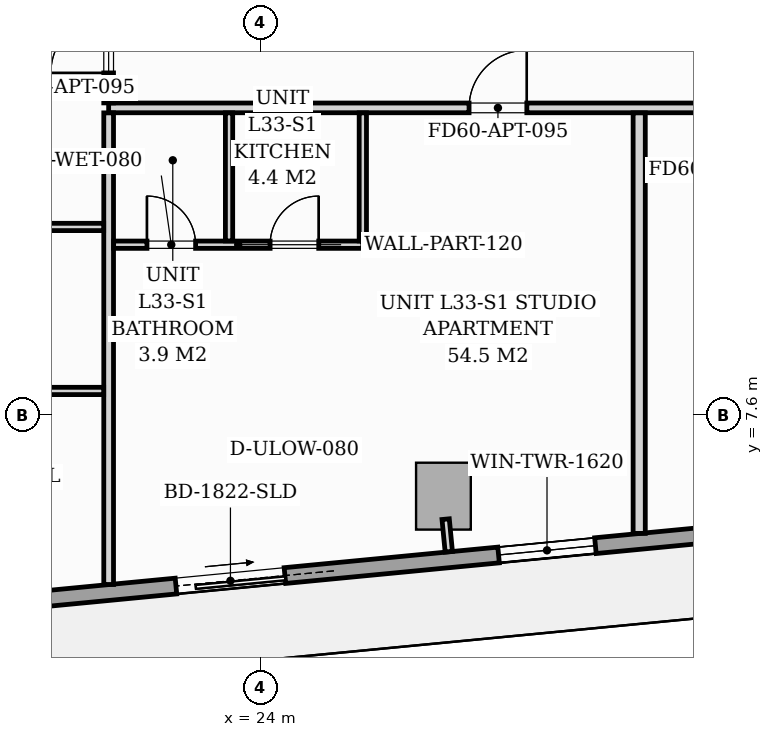
"""IFC4 building model, lengths in metres.
Left out: names, types, materials, properties, quantities, classifications, styles, units other than length and angle.
Written with IfcOpenShell. Run it as: python <this file> out.ifc"""

import sys

from ifc_helpers import new_model, si_unit, direction, frame, frame_2d, origin, origin_2d, place, context, subcontext, project, spatial, rectangle, extrude, source, transform, mapped, element, fill, save


model = new_model("IFC4")
c1 = context("Model", 3, precision=1e-05, world=origin(), true_north=direction((0.0, 1.0)))
c2 = subcontext(c1, "Body", "Model", "MODEL_VIEW")
j1 = project(units=[si_unit("LENGTHUNIT", "METRE"), si_unit("PLANEANGLEUNIT", "RADIAN")], contexts=[c1])
p1 = place(None, origin())
s1 = spatial("IfcSite", under=j1, at=p1, CompositionType="ELEMENT")
p2 = place(p1, origin())
s2 = spatial("IfcBuilding", under=s1, at=p2, CompositionType="ELEMENT")
p3 = place(p2, frame((0.0, 0.0, 116.2)))
s3 = spatial("IfcBuildingStorey", under=s2, at=p3, CompositionType="ELEMENT", Elevation=116.2)
m1 = source(origin(), c2, "Body", "SweptSolid", [
    extrude(rectangle(XDim=0.9, YDim=1.1, at=origin_2d()), origin(), (0.0, 0.0, 1.0), 3.194),
])
p4 = place(p3, frame((27.006, 6.265, 0.002), z_axis=(0.0, 0.0, 1.0), x_axis=(0.995396198367, 0.09584575252, 0.0)))
e1 = element("IfcColumn", 1, at=p4, inside=s3, PredefinedType="COLUMN", context=c2, shape_type="MappedRepresentation", body=[
    mapped(m1, transform((0.0, 0.0, 0.0), scale=1.0)),
])
p5 = place(p3, frame((31.994, 5.69, 0.0), z_axis=(0.0, 0.0, 1.0), x_axis=(-0.995396521236, -0.095842399342, 0.0)))
e2 = element("IfcWall", 2, at=p5, inside=s3, PredefinedType="STANDARD", context=c2, shape_type="SweptSolid", body=[
    extrude(rectangle(XDim=19.11, YDim=0.26, at=frame_2d((9.555, 0.0))), origin(), (0.0, 0.0, 1.0), 2.9),
])
p6 = place(p5, frame((7.63, 0.0, 0.0)))
e3 = element("IfcOpeningElement", 3, at=p6, cuts=e2, PredefinedType="OPENING", context=c2, shape_type="SweptSolid", body=[
    extrude(rectangle(XDim=1.8, YDim=2.06, at=frame_2d((0.9, 1.03))), frame((0.0, 0.14, 0.0), z_axis=(0.0, -1.0, 0.0), x_axis=(1.0, 0.0, 0.0)), (0.0, 0.0, 1.0), 0.28),
])
p7 = place(p5, frame((2.5, 0.0, 0.65)))
e4 = element("IfcOpeningElement", 4, at=p7, cuts=e2, PredefinedType="OPENING", context=c2, shape_type="SweptSolid", body=[
    extrude(rectangle(XDim=1.6, YDim=1.5, at=frame_2d((0.8, 0.75))), frame((0.0, 0.14, 0.0), z_axis=(0.0, -1.0, 0.0), x_axis=(1.0, 0.0, 0.0)), (0.0, 0.0, 1.0), 0.28),
])
p8 = place(p3, frame((21.5, 12.65, 0.0), z_axis=(0.0, 0.0, 1.0), x_axis=(1.0, 0.0, 0.0)))
e5 = element("IfcWall", 5, at=p8, inside=s3, PredefinedType="PARTITIONING", context=c2, shape_type="SweptSolid", body=[
    extrude(rectangle(XDim=26.2, YDim=0.16, at=frame_2d((13.1, 0.0))), origin(), (0.0, 0.0, 1.0), 2.9),
])
p9 = place(p8, frame((5.927, 0.0, 0.0)))
e6 = element("IfcOpeningElement", 6, at=p9, cuts=e5, PredefinedType="OPENING", context=c2, shape_type="SweptSolid", body=[
    extrude(rectangle(XDim=0.95, YDim=2.06, at=frame_2d((0.475, 1.03))), frame((0.0, 0.09, 0.0), z_axis=(0.0, -1.0, 0.0), x_axis=(1.0, 0.0, 0.0)), (0.0, 0.0, 1.0), 0.18),
])
p10 = place(p8, frame((10.575, 0.0, 0.0)))
e7 = element("IfcOpeningElement", 7, at=p10, cuts=e5, PredefinedType="OPENING", context=c2, shape_type="SweptSolid", body=[
    extrude(rectangle(XDim=0.95, YDim=2.06, at=frame_2d((0.475, 1.03))), frame((0.0, 0.09, 0.0), z_axis=(0.0, -1.0, 0.0), x_axis=(1.0, 0.0, 0.0)), (0.0, 0.0, 1.0), 0.18),
])
p11 = place(p8, frame((19.322, 0.0, 0.0)))
e8 = element("IfcOpeningElement", 8, at=p11, cuts=e5, PredefinedType="OPENING", context=c2, shape_type="SweptSolid", body=[
    extrude(rectangle(XDim=0.95, YDim=2.06, at=frame_2d((0.475, 1.03))), frame((0.0, 0.09, 0.0), z_axis=(0.0, -1.0, 0.0), x_axis=(1.0, 0.0, 0.0)), (0.0, 0.0, 1.0), 0.18),
])
p12 = place(p3, frame((21.5, 4.812, 0.0), z_axis=(0.0, 0.0, 1.0), x_axis=(0.0, 1.0, 0.0)))
e9 = element("IfcWall", 9, at=p12, inside=s3, PredefinedType="PARTITIONING", context=c2, shape_type="SweptSolid", body=[
    extrude(rectangle(XDim=7.756, YDim=0.16, at=frame_2d((3.878, 0.0))), origin(), (0.0, 0.0, 1.0), 2.9),
])
p13 = place(p3, frame((21.5, 12.732, 0.0), z_axis=(0.0, 0.0, 1.0), x_axis=(0.0, 1.0, 0.0)))
e10 = element("IfcWall", 10, at=p13, inside=s3, PredefinedType="PARTITIONING", context=c2, shape_type="SweptSolid", body=[
    extrude(rectangle(XDim=11.647, YDim=0.16, at=frame_2d((5.823, 0.0))), origin(), (0.0, 0.0, 1.0), 2.9),
])
p14 = place(p13, frame((0.493, 0.0, 0.0)))
e11 = element("IfcOpeningElement", 11, at=p14, cuts=e10, PredefinedType="OPENING", context=c2, shape_type="SweptSolid", body=[
    extrude(rectangle(XDim=0.95, YDim=2.06, at=frame_2d((0.475, 1.03))), frame((0.0, 0.09, 0.0), z_axis=(0.0, -1.0, 0.0), x_axis=(1.0, 0.0, 0.0)), (0.0, 0.0, 1.0), 0.18),
])
p15 = place(p13, frame((6.085, 0.0, 0.0)))
e12 = element("IfcOpeningElement", 12, at=p15, cuts=e10, PredefinedType="OPENING", context=c2, shape_type="SweptSolid", body=[
    extrude(rectangle(XDim=0.95, YDim=2.06, at=frame_2d((0.475, 1.03))), frame((0.0, 0.09, 0.0), z_axis=(0.0, -1.0, 0.0), x_axis=(1.0, 0.0, 0.0)), (0.0, 0.0, 1.0), 0.18),
])
p16 = place(p3, frame((21.582, 10.4, 0.0), z_axis=(0.0, 0.0, 1.0), x_axis=(1.0, 0.0, 0.0)))
e13 = element("IfcWall", 13, at=p16, inside=s3, PredefinedType="PARTITIONING", context=c2, shape_type="SweptSolid", body=[
    extrude(rectangle(XDim=4.098, YDim=0.12, at=frame_2d((2.049, 0.0))), origin(), (0.0, 0.0, 1.0), 2.9),
])
p17 = place(p16, frame((0.548, 0.0, 0.0)))
e14 = element("IfcOpeningElement", 14, at=p17, cuts=e13, PredefinedType="OPENING", context=c2, shape_type="SweptSolid", body=[
    extrude(rectangle(XDim=0.8, YDim=2.02, at=frame_2d((0.4, 1.01))), frame((0.0, 0.07, 0.0), z_axis=(0.0, -1.0, 0.0), x_axis=(1.0, 0.0, 0.0)), (0.0, 0.0, 1.0), 0.14),
])
p18 = place(p16, frame((2.573, 0.0, 0.0)))
e15 = element("IfcOpeningElement", 15, at=p18, cuts=e13, PredefinedType="OPENING", context=c2, shape_type="SweptSolid", body=[
    extrude(rectangle(XDim=0.8, YDim=2.0, at=frame_2d((0.4, 1.0))), frame((0.0, 0.07, 0.0), z_axis=(0.0, -1.0, 0.0), x_axis=(1.0, 0.0, 0.0)), (0.0, 0.0, 1.0), 0.14),
])
for number, where, z_axis, x_axis in (
    (16, (25.68, 10.462, 0.0), (0.0, 0.0, 1.0), (0.0, 1.0, 0.0)),
    (17, (23.48, 10.462, 0.0), (0.0, 0.0, 1.0), (0.0, 1.0, 0.0)),
):
    element("IfcWall", number, at=place(p3, frame(where, z_axis=z_axis, x_axis=x_axis)), inside=s3, PredefinedType="PARTITIONING", context=c2, shape_type="SweptSolid", body=[
        extrude(rectangle(XDim=2.106, YDim=0.12, at=frame_2d((1.053, 0.0))), origin(), (0.0, 0.0, 1.0), 2.9),
    ])
p19 = place(p3, frame((30.225, 5.653, 0.0), z_axis=(0.0, 0.0, 1.0), x_axis=(0.0, 1.0, 0.0)))
e18 = element("IfcWall", 18, at=p19, inside=s3, PredefinedType="PARTITIONING", context=c2, shape_type="SweptSolid", body=[
    extrude(rectangle(XDim=6.916, YDim=0.2, at=frame_2d((3.458, 0.0))), origin(), (0.0, 0.0, 1.0), 2.9),
])
p20 = place(p3, frame((12.377, 7.995, 0.0), z_axis=(0.0, 0.0, 1.0), x_axis=(1.0, 0.0, 0.0)))
e19 = element("IfcWall", 19, at=p20, inside=s3, PredefinedType="PARTITIONING", context=c2, shape_type="SweptSolid", body=[
    extrude(rectangle(XDim=9.041, YDim=0.12, at=frame_2d((4.521, 0.0))), origin(), (0.0, 0.0, 1.0), 2.9),
])
p21 = place(p20, frame((4.096, 0.0, 0.0)))
e20 = element("IfcOpeningElement", 20, at=p21, cuts=e19, PredefinedType="OPENING", context=c2, shape_type="SweptSolid", body=[
    extrude(rectangle(XDim=0.85, YDim=2.05, at=frame_2d((0.425, 1.025))), frame((0.0, 0.07, 0.0), z_axis=(0.0, -1.0, 0.0), x_axis=(1.0, 0.0, 0.0)), (0.0, 0.0, 1.0), 0.14),
])
p22 = place(p3, frame((12.377, 10.692, 0.0), z_axis=(0.0, 0.0, 1.0), x_axis=(1.0, 0.0, 0.0)))
e21 = element("IfcWall", 21, at=p22, inside=s3, PredefinedType="PARTITIONING", context=c2, shape_type="SweptSolid", body=[
    extrude(rectangle(XDim=9.041, YDim=0.12, at=frame_2d((4.521, 0.0))), origin(), (0.0, 0.0, 1.0), 2.9),
])
p23 = place(p22, frame((4.096, 0.0, 0.0)))
e22 = element("IfcOpeningElement", 22, at=p23, cuts=e21, PredefinedType="OPENING", context=c2, shape_type="SweptSolid", body=[
    extrude(rectangle(XDim=0.85, YDim=2.05, at=frame_2d((0.425, 1.025))), frame((0.0, 0.07, 0.0), z_axis=(0.0, -1.0, 0.0), x_axis=(1.0, 0.0, 0.0)), (0.0, 0.0, 1.0), 0.14),
])
p24 = place(p3, frame((27.042, 5.887, 0.0), z_axis=(0.0, 0.0, 1.0), x_axis=(0.096222656154, -0.995359834654, 0.0)))
e23 = element("IfcWall", 23, at=p24, inside=s3, PredefinedType="PARTITIONING", context=c2, shape_type="SweptSolid", body=[
    extrude(rectangle(XDim=0.538, YDim=0.12, at=frame_2d((0.269, 0.0))), origin(), (0.0, 0.0, 1.0), 2.9),
])
m2 = source(origin(), c2, "Body", "SweptSolid", [
    extrude(rectangle(XDim=1.8, YDim=2.06, at=frame_2d((0.9, 1.03))), frame((0.0, 0.025, 0.0), z_axis=(0.0, -1.0, 0.0), x_axis=(1.0, 0.0, 0.0)), (0.0, 0.0, 1.0), 0.05),
])
p25 = place(p6, origin())
e24 = element("IfcDoor", 24, at=p25, inside=s3, OperationType="SLIDING_TO_LEFT", PredefinedType="DOOR", context=c2, shape_type="MappedRepresentation", body=[
    mapped(m2, transform((0.0, 0.0, 0.0), scale=1.0)),
])
fill(e3, e24)
m3 = source(origin(), c2, "Body", "SweptSolid", [
    extrude(rectangle(XDim=1.6, YDim=1.5, at=frame_2d((0.8, 0.75))), frame((0.0, 0.03, 0.0), z_axis=(0.0, -1.0, 0.0), x_axis=(1.0, 0.0, 0.0)), (0.0, 0.0, 1.0), 0.06),
])
p26 = place(p7, origin())
e25 = element("IfcWindow", 25, at=p26, inside=s3, PartitioningType="SINGLE_PANEL", PredefinedType="WINDOW", context=c2, shape_type="MappedRepresentation", body=[
    mapped(m3, transform((0.0, 0.0, 0.0), scale=1.0)),
])
fill(e4, e25)
m4 = source(origin(), c2, "Body", "SweptSolid", [
    extrude(rectangle(XDim=0.95, YDim=2.06, at=frame_2d((0.475, 1.03))), frame((0.0, 0.025, 0.0), z_axis=(0.0, -1.0, 0.0), x_axis=(1.0, 0.0, 0.0)), (0.0, 0.0, 1.0), 0.05),
])
p27 = place(p9, origin())
e26 = element("IfcDoor", 26, at=p27, inside=s3, OperationType="SINGLE_SWING_RIGHT", PredefinedType="DOOR", context=c2, shape_type="MappedRepresentation", body=[
    mapped(m4, transform((0.0, 0.0, 0.0), scale=1.0)),
])
fill(e6, e26)
m5 = source(origin(), c2, "Body", "SweptSolid", [
    extrude(rectangle(XDim=0.8, YDim=2.02, at=frame_2d((0.4, 1.01))), frame((0.0, 0.025, 0.0), z_axis=(0.0, -1.0, 0.0), x_axis=(1.0, 0.0, 0.0)), (0.0, 0.0, 1.0), 0.05),
])
p28 = place(p17, origin())
e27 = element("IfcDoor", 27, at=p28, inside=s3, OperationType="SINGLE_SWING_LEFT", PredefinedType="DOOR", context=c2, shape_type="MappedRepresentation", body=[
    mapped(m5, transform((0.0, 0.0, 0.0), scale=1.0)),
])
fill(e14, e27)
m6 = source(origin(), c2, "Body", "SweptSolid", [
    extrude(rectangle(XDim=0.8, YDim=2.0, at=frame_2d((0.4, 1.0))), frame((0.0, 0.025, 0.0), z_axis=(0.0, -1.0, 0.0), x_axis=(1.0, 0.0, 0.0)), (0.0, 0.0, 1.0), 0.05),
])
p29 = place(p18, origin())
e28 = element("IfcDoor", 28, at=p29, inside=s3, OperationType="SINGLE_SWING_RIGHT", PredefinedType="DOOR", context=c2, shape_type="MappedRepresentation", body=[
    mapped(m6, transform((0.0, 0.0, 0.0), scale=1.0)),
])
fill(e15, e28)
p30 = place(p14, origin())
e29 = element("IfcDoor", 29, at=p30, inside=s3, OperationType="SINGLE_SWING_LEFT", PredefinedType="DOOR", context=c2, shape_type="MappedRepresentation", body=[
    mapped(m4, transform((0.0, 0.0, 0.0), scale=1.0)),
])
fill(e11, e29)
save(model, sys.argv[1])
